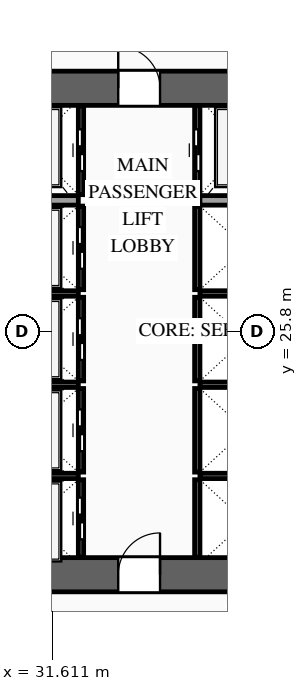
"""IFC4 building model, lengths in metres.
Left out: names, types, materials, properties, quantities, classifications, styles, units other than length and angle.
Written with IfcOpenShell. Run it as: python <this file> out.ifc"""

import sys

from ifc_helpers import new_model, si_unit, direction, frame, frame_2d, origin, place, context, subcontext, project, spatial, rectangle, extrude, source, transform, mapped, element, fill, save


model = new_model("IFC4")
c1 = context("Model", 3, precision=1e-05, world=origin(), true_north=direction((0.0, 1.0)))
c2 = subcontext(c1, "Body", "Model", "MODEL_VIEW")
j1 = project(units=[si_unit("LENGTHUNIT", "METRE"), si_unit("PLANEANGLEUNIT", "RADIAN")], contexts=[c1])
p1 = place(None, origin())
s1 = spatial("IfcSite", under=j1, at=p1, CompositionType="ELEMENT")
p2 = place(p1, origin())
s2 = spatial("IfcBuilding", under=s1, at=p2, CompositionType="ELEMENT")
p3 = place(p2, frame((0.0, 0.0, 30.6)))
s3 = spatial("IfcBuildingStorey", under=s2, at=p3, CompositionType="ELEMENT", Elevation=30.6)
p4 = place(p3, frame((23.35, 19.4, 0.0), z_axis=(0.0, 0.0, 1.0), x_axis=(1.0, 0.0, 0.0)))
e1 = element("IfcWall", 1, at=p4, inside=s3, PredefinedType="SHEAR", context=c2, shape_type="SweptSolid", body=[
    extrude(rectangle(XDim=27.3, YDim=0.9, at=frame_2d((13.65, 0.0))), origin(), (0.0, 0.0, 1.0), 3.6),
])
p5 = place(p4, frame((2.1, 0.0, 0.0)))
e2 = element("IfcOpeningElement", 2, at=p5, cuts=e1, PredefinedType="OPENING", context=c2, shape_type="SweptSolid", body=[
    extrude(rectangle(XDim=1.1, YDim=2.2, at=frame_2d((0.55, 1.1))), frame((0.0, 0.465, 0.0), z_axis=(0.0, -1.0, 0.0), x_axis=(1.0, 0.0, 0.0)), (0.0, 0.0, 1.0), 0.93),
])
p6 = place(p4, frame((10.0, 0.0, 0.0)))
e3 = element("IfcOpeningElement", 3, at=p6, cuts=e1, PredefinedType="OPENING", context=c2, shape_type="SweptSolid", body=[
    extrude(rectangle(XDim=1.1, YDim=2.2, at=frame_2d((0.55, 1.1))), frame((0.0, 0.465, 0.0), z_axis=(0.0, -1.0, 0.0), x_axis=(1.0, 0.0, 0.0)), (0.0, 0.0, 1.0), 0.93),
])
p7 = place(p4, frame((23.2, 0.0, 0.0)))
e4 = element("IfcOpeningElement", 4, at=p7, cuts=e1, PredefinedType="OPENING", context=c2, shape_type="SweptSolid", body=[
    extrude(rectangle(XDim=1.1, YDim=2.2, at=frame_2d((0.55, 1.1))), frame((0.0, 0.465, 0.0), z_axis=(0.0, -1.0, 0.0), x_axis=(1.0, 0.0, 0.0)), (0.0, 0.0, 1.0), 0.93),
])
p8 = place(p4, frame((19.82, 0.0, 0.0)))
e5 = element("IfcOpeningElement", 5, at=p8, cuts=e1, PredefinedType="OPENING", context=c2, shape_type="SweptSolid", body=[
    extrude(rectangle(XDim=0.9, YDim=2.15, at=frame_2d((0.45, 1.075))), frame((0.0, 0.465, 0.0), z_axis=(0.0, -1.0, 0.0), x_axis=(1.0, 0.0, 0.0)), (0.0, 0.0, 1.0), 0.93),
])
p9 = place(p4, frame((18.38, 0.0, 0.0)))
e6 = element("IfcOpeningElement", 6, at=p9, cuts=e1, PredefinedType="OPENING", context=c2, shape_type="SweptSolid", body=[
    extrude(rectangle(XDim=0.9, YDim=2.15, at=frame_2d((0.45, 1.075))), frame((0.0, 0.465, 0.0), z_axis=(0.0, -1.0, 0.0), x_axis=(1.0, 0.0, 0.0)), (0.0, 0.0, 1.0), 0.93),
])
p10 = place(p3, frame((23.35, 32.2, 0.0), z_axis=(0.0, 0.0, 1.0), x_axis=(1.0, 0.0, 0.0)))
e7 = element("IfcWall", 7, at=p10, inside=s3, PredefinedType="SHEAR", context=c2, shape_type="SweptSolid", body=[
    extrude(rectangle(XDim=27.3, YDim=0.9, at=frame_2d((13.65, 0.0))), origin(), (0.0, 0.0, 1.0), 3.6),
])
p11 = place(p10, frame((4.72, 0.0, 0.0)))
e8 = element("IfcOpeningElement", 8, at=p11, cuts=e7, PredefinedType="OPENING", context=c2, shape_type="SweptSolid", body=[
    extrude(rectangle(XDim=0.9, YDim=2.15, at=frame_2d((0.45, 1.075))), frame((0.0, 0.465, 0.0), z_axis=(0.0, -1.0, 0.0), x_axis=(1.0, 0.0, 0.0)), (0.0, 0.0, 1.0), 0.93),
])
p12 = place(p10, frame((10.0, 0.0, 0.0)))
e9 = element("IfcOpeningElement", 9, at=p12, cuts=e7, PredefinedType="OPENING", context=c2, shape_type="SweptSolid", body=[
    extrude(rectangle(XDim=1.1, YDim=2.2, at=frame_2d((0.55, 1.1))), frame((0.0, 0.465, 0.0), z_axis=(0.0, -1.0, 0.0), x_axis=(1.0, 0.0, 0.0)), (0.0, 0.0, 1.0), 0.93),
])
p13 = place(p10, frame((15.85, 0.0, 0.0)))
e10 = element("IfcOpeningElement", 10, at=p13, cuts=e7, PredefinedType="OPENING", context=c2, shape_type="SweptSolid", body=[
    extrude(rectangle(XDim=1.1, YDim=2.2, at=frame_2d((0.55, 1.1))), frame((0.0, 0.465, 0.0), z_axis=(0.0, -1.0, 0.0), x_axis=(1.0, 0.0, 0.0)), (0.0, 0.0, 1.0), 0.93),
])
p14 = place(p3, frame((32.37, 19.86, 0.0), z_axis=(0.0, 0.0, 1.0), x_axis=(0.0, 1.0, 0.0)))
e11 = element("IfcWall", 11, at=p14, inside=s3, PredefinedType="SOLIDWALL", context=c2, shape_type="SweptSolid", body=[
    extrude(rectangle(XDim=2.04, YDim=0.14, at=frame_2d((1.02, 0.0))), origin(), (0.0, 0.0, 1.0), 3.38),
])
p15 = place(p14, frame((0.47, 0.0, 0.0)))
e12 = element("IfcOpeningElement", 12, at=p15, cuts=e11, PredefinedType="OPENING", context=c2, shape_type="SweptSolid", body=[
    extrude(rectangle(XDim=1.1, YDim=2.2, at=frame_2d((0.55, 1.1))), frame((0.0, 0.085, 0.0), z_axis=(0.0, -1.0, 0.0), x_axis=(1.0, 0.0, 0.0)), (0.0, 0.0, 1.0), 0.17),
])
m1 = source(origin(), c2, "Body", "SweptSolid", [
    extrude(rectangle(XDim=2.5, YDim=0.14, at=frame_2d((1.25, 0.0))), origin(), (0.0, 0.0, 1.0), 3.38),
])
p16 = place(p3, frame((29.8, 22.0, 0.0), z_axis=(0.0, 0.0, 1.0), x_axis=(1.0, 0.0, 0.0)))
e13 = element("IfcWall", 13, at=p16, inside=s3, PredefinedType="SOLIDWALL", context=c2, shape_type="MappedRepresentation", body=[
    mapped(m1, transform((0.0, 0.0, 0.0), scale=1.0)),
])
p17 = place(p3, frame((32.37, 22.1, 0.0), z_axis=(0.0, 0.0, 1.0), x_axis=(0.0, 1.0, 0.0)))
e14 = element("IfcWall", 14, at=p17, inside=s3, PredefinedType="SOLIDWALL", context=c2, shape_type="SweptSolid", body=[
    extrude(rectangle(XDim=2.2, YDim=0.14, at=frame_2d((1.1, 0.0))), origin(), (0.0, 0.0, 1.0), 3.38),
])
p18 = place(p17, frame((0.55, 0.0, 0.0)))
e15 = element("IfcOpeningElement", 15, at=p18, cuts=e14, PredefinedType="OPENING", context=c2, shape_type="SweptSolid", body=[
    extrude(rectangle(XDim=1.1, YDim=2.2, at=frame_2d((0.55, 1.1))), frame((0.0, 0.085, 0.0), z_axis=(0.0, -1.0, 0.0), x_axis=(1.0, 0.0, 0.0)), (0.0, 0.0, 1.0), 0.17),
])
p19 = place(p3, frame((29.8, 24.4, 0.0), z_axis=(0.0, 0.0, 1.0), x_axis=(1.0, 0.0, 0.0)))
e16 = element("IfcWall", 16, at=p19, inside=s3, PredefinedType="SOLIDWALL", context=c2, shape_type="MappedRepresentation", body=[
    mapped(m1, transform((0.0, 0.0, 0.0), scale=1.0)),
])
p20 = place(p3, frame((32.37, 24.5, 0.0), z_axis=(0.0, 0.0, 1.0), x_axis=(0.0, 1.0, 0.0)))
e17 = element("IfcWall", 17, at=p20, inside=s3, PredefinedType="SOLIDWALL", context=c2, shape_type="SweptSolid", body=[
    extrude(rectangle(XDim=2.2, YDim=0.14, at=frame_2d((1.1, 0.0))), origin(), (0.0, 0.0, 1.0), 3.38),
])
p21 = place(p20, frame((0.55, 0.0, 0.0)))
e18 = element("IfcOpeningElement", 18, at=p21, cuts=e17, PredefinedType="OPENING", context=c2, shape_type="SweptSolid", body=[
    extrude(rectangle(XDim=1.1, YDim=2.2, at=frame_2d((0.55, 1.1))), frame((0.0, 0.085, 0.0), z_axis=(0.0, -1.0, 0.0), x_axis=(1.0, 0.0, 0.0)), (0.0, 0.0, 1.0), 0.17),
])
p22 = place(p3, frame((29.8, 26.8, 0.0), z_axis=(0.0, 0.0, 1.0), x_axis=(1.0, 0.0, 0.0)))
e19 = element("IfcWall", 19, at=p22, inside=s3, PredefinedType="SOLIDWALL", context=c2, shape_type="MappedRepresentation", body=[
    mapped(m1, transform((0.0, 0.0, 0.0), scale=1.0)),
])
p23 = place(p3, frame((32.37, 26.9, 0.0), z_axis=(0.0, 0.0, 1.0), x_axis=(0.0, 1.0, 0.0)))
e20 = element("IfcWall", 20, at=p23, inside=s3, PredefinedType="SOLIDWALL", context=c2, shape_type="SweptSolid", body=[
    extrude(rectangle(XDim=2.2, YDim=0.14, at=frame_2d((1.1, 0.0))), origin(), (0.0, 0.0, 1.0), 3.38),
])
p24 = place(p23, frame((0.55, 0.0, 0.0)))
e21 = element("IfcOpeningElement", 21, at=p24, cuts=e20, PredefinedType="OPENING", context=c2, shape_type="SweptSolid", body=[
    extrude(rectangle(XDim=1.1, YDim=2.2, at=frame_2d((0.55, 1.1))), frame((0.0, 0.085, 0.0), z_axis=(0.0, -1.0, 0.0), x_axis=(1.0, 0.0, 0.0)), (0.0, 0.0, 1.0), 0.17),
])
p25 = place(p3, frame((32.37, 29.4, 0.0), z_axis=(0.0, 0.0, 1.0), x_axis=(0.0, 1.0, 0.0)))
e22 = element("IfcWall", 22, at=p25, inside=s3, PredefinedType="SOLIDWALL", context=c2, shape_type="SweptSolid", body=[
    extrude(rectangle(XDim=2.34, YDim=0.14, at=frame_2d((1.17, 0.0))), origin(), (0.0, 0.0, 1.0), 3.38),
])
p26 = place(p25, frame((0.62, 0.0, 0.0)))
e23 = element("IfcOpeningElement", 23, at=p26, cuts=e22, PredefinedType="OPENING", context=c2, shape_type="SweptSolid", body=[
    extrude(rectangle(XDim=1.1, YDim=2.2, at=frame_2d((0.55, 1.1))), frame((0.0, 0.085, 0.0), z_axis=(0.0, -1.0, 0.0), x_axis=(1.0, 0.0, 0.0)), (0.0, 0.0, 1.0), 0.17),
])
m2 = source(origin(), c2, "Body", "SweptSolid", [
    extrude(rectangle(XDim=2.5, YDim=0.25, at=frame_2d((1.25, 0.0))), origin(), (0.0, 0.0, 1.0), 3.38),
])
p27 = place(p3, frame((29.8, 29.25, 0.0), z_axis=(0.0, 0.0, 1.0), x_axis=(1.0, 0.0, 0.0)))
e24 = element("IfcWall", 24, at=p27, inside=s3, PredefinedType="SOLIDWALL", context=c2, shape_type="MappedRepresentation", body=[
    mapped(m2, transform((0.0, 0.0, 0.0), scale=1.0)),
])
m3 = source(origin(), c2, "Body", "SweptSolid", [
    extrude(rectangle(XDim=2.04, YDim=0.14, at=frame_2d((1.02, 0.0))), origin(), (0.0, 0.0, 1.0), 3.38),
])
p28 = place(p3, frame((35.43, 19.86, 0.0), z_axis=(0.0, 0.0, 1.0), x_axis=(0.0, 1.0, 0.0)))
e25 = element("IfcWall", 25, at=p28, inside=s3, PredefinedType="SOLIDWALL", context=c2, shape_type="MappedRepresentation", body=[
    mapped(m3, transform((0.0, 0.0, 0.0), scale=1.0)),
])
m4 = source(origin(), c2, "Body", "SweptSolid", [
    extrude(rectangle(XDim=2.4, YDim=0.14, at=frame_2d((1.2, 0.0))), origin(), (0.0, 0.0, 1.0), 3.38),
])
p29 = place(p3, frame((35.5, 22.0, 0.0), z_axis=(0.0, 0.0, 1.0), x_axis=(1.0, 0.0, 0.0)))
e26 = element("IfcWall", 26, at=p29, inside=s3, PredefinedType="SOLIDWALL", context=c2, shape_type="MappedRepresentation", body=[
    mapped(m4, transform((0.0, 0.0, 0.0), scale=1.0)),
])
m5 = source(origin(), c2, "Body", "SweptSolid", [
    extrude(rectangle(XDim=2.2, YDim=0.14, at=frame_2d((1.1, 0.0))), origin(), (0.0, 0.0, 1.0), 3.38),
])
p30 = place(p3, frame((35.43, 22.1, 0.0), z_axis=(0.0, 0.0, 1.0), x_axis=(0.0, 1.0, 0.0)))
e27 = element("IfcWall", 27, at=p30, inside=s3, PredefinedType="SOLIDWALL", context=c2, shape_type="MappedRepresentation", body=[
    mapped(m5, transform((0.0, 0.0, 0.0), scale=1.0)),
])
p31 = place(p3, frame((35.5, 24.4, 0.0), z_axis=(0.0, 0.0, 1.0), x_axis=(1.0, 0.0, 0.0)))
e28 = element("IfcWall", 28, at=p31, inside=s3, PredefinedType="SOLIDWALL", context=c2, shape_type="MappedRepresentation", body=[
    mapped(m4, transform((0.0, 0.0, 0.0), scale=1.0)),
])
p32 = place(p3, frame((35.43, 24.5, 0.0), z_axis=(0.0, 0.0, 1.0), x_axis=(0.0, 1.0, 0.0)))
e29 = element("IfcWall", 29, at=p32, inside=s3, PredefinedType="SOLIDWALL", context=c2, shape_type="MappedRepresentation", body=[
    mapped(m5, transform((0.0, 0.0, 0.0), scale=1.0)),
])
p33 = place(p3, frame((35.5, 26.8, 0.0), z_axis=(0.0, 0.0, 1.0), x_axis=(1.0, 0.0, 0.0)))
e30 = element("IfcWall", 30, at=p33, inside=s3, PredefinedType="SOLIDWALL", context=c2, shape_type="MappedRepresentation", body=[
    mapped(m4, transform((0.0, 0.0, 0.0), scale=1.0)),
])
m6 = source(origin(), c2, "Body", "SweptSolid", [
    extrude(rectangle(XDim=2.2, YDim=0.14, at=frame_2d((1.1, 0.0))), origin(), (0.0, 0.0, 1.0), 3.38),
])
p34 = place(p3, frame((35.43, 26.9, 0.0), z_axis=(0.0, 0.0, 1.0), x_axis=(0.0, 1.0, 0.0)))
e31 = element("IfcWall", 31, at=p34, inside=s3, PredefinedType="SOLIDWALL", context=c2, shape_type="MappedRepresentation", body=[
    mapped(m6, transform((0.0, 0.0, 0.0), scale=1.0)),
])
p35 = place(p3, frame((35.43, 29.4, 0.0), z_axis=(0.0, 0.0, 1.0), x_axis=(0.0, 1.0, 0.0)))
e32 = element("IfcWall", 32, at=p35, inside=s3, PredefinedType="SOLIDWALL", context=c2, shape_type="SweptSolid", body=[
    extrude(rectangle(XDim=2.34, YDim=0.14, at=frame_2d((1.17, 0.0))), origin(), (0.0, 0.0, 1.0), 3.38),
])
p36 = place(p35, frame((0.62, 0.0, 0.0)))
e33 = element("IfcOpeningElement", 33, at=p36, cuts=e32, PredefinedType="OPENING", context=c2, shape_type="SweptSolid", body=[
    extrude(rectangle(XDim=1.1, YDim=2.2, at=frame_2d((0.55, 1.1))), frame((0.0, 0.085, 0.0), z_axis=(0.0, -1.0, 0.0), x_axis=(1.0, 0.0, 0.0)), (0.0, 0.0, 1.0), 0.17),
])
m7 = source(origin(), c2, "Body", "SweptSolid", [
    extrude(rectangle(XDim=2.4, YDim=0.25, at=frame_2d((1.2, 0.0))), origin(), (0.0, 0.0, 1.0), 3.38),
])
p37 = place(p3, frame((35.5, 29.25, 0.0), z_axis=(0.0, 0.0, 1.0), x_axis=(1.0, 0.0, 0.0)))
e34 = element("IfcWall", 34, at=p37, inside=s3, PredefinedType="SOLIDWALL", context=c2, shape_type="MappedRepresentation", body=[
    mapped(m7, transform((0.0, 0.0, 0.0), scale=1.0)),
])
m8 = source(origin(), c2, "Body", "SweptSolid", [
    extrude(rectangle(XDim=1.1, YDim=2.2, at=frame_2d((0.55, 1.1))), frame((0.0, 0.025, 0.0), z_axis=(0.0, -1.0, 0.0), x_axis=(1.0, 0.0, 0.0)), (0.0, 0.0, 1.0), 0.05),
])
p38 = place(p15, origin())
e35 = element("IfcDoor", 35, at=p38, inside=s3, OperationType="SLIDING_TO_LEFT", PredefinedType="DOOR", context=c2, shape_type="MappedRepresentation", body=[
    mapped(m8, transform((0.0, 0.0, 0.0), scale=1.0)),
])
fill(e12, e35)
p39 = place(p18, origin())
e36 = element("IfcDoor", 36, at=p39, inside=s3, OperationType="SLIDING_TO_RIGHT", PredefinedType="DOOR", context=c2, shape_type="MappedRepresentation", body=[
    mapped(m8, transform((0.0, 0.0, 0.0), scale=1.0)),
])
fill(e15, e36)
p40 = place(p21, origin())
e37 = element("IfcDoor", 37, at=p40, inside=s3, OperationType="SLIDING_TO_LEFT", PredefinedType="DOOR", context=c2, shape_type="MappedRepresentation", body=[
    mapped(m8, transform((0.0, 0.0, 0.0), scale=1.0)),
])
fill(e18, e37)
p41 = place(p24, origin())
e38 = element("IfcDoor", 38, at=p41, inside=s3, OperationType="SLIDING_TO_RIGHT", PredefinedType="DOOR", context=c2, shape_type="MappedRepresentation", body=[
    mapped(m8, transform((0.0, 0.0, 0.0), scale=1.0)),
])
fill(e21, e38)
p42 = place(p26, origin())
e39 = element("IfcDoor", 39, at=p42, inside=s3, OperationType="SLIDING_TO_LEFT", PredefinedType="DOOR", context=c2, shape_type="MappedRepresentation", body=[
    mapped(m8, transform((0.0, 0.0, 0.0), scale=1.0)),
])
fill(e23, e39)
p43 = place(p36, origin())
e40 = element("IfcDoor", 40, at=p43, inside=s3, OperationType="SLIDING_TO_RIGHT", PredefinedType="DOOR", context=c2, shape_type="MappedRepresentation", body=[
    mapped(m8, transform((0.0, 0.0, 0.0), scale=1.0)),
])
fill(e33, e40)
m9 = source(origin(), c2, "Body", "SweptSolid", [
    extrude(rectangle(XDim=1.1, YDim=2.2, at=frame_2d((0.55, 1.1))), frame((0.0, 0.025, 0.0), z_axis=(0.0, -1.0, 0.0), x_axis=(1.0, 0.0, 0.0)), (0.0, 0.0, 1.0), 0.05),
])
p44 = place(p6, origin())
e41 = element("IfcDoor", 41, at=p44, inside=s3, OperationType="SINGLE_SWING_RIGHT", PredefinedType="DOOR", context=c2, shape_type="MappedRepresentation", body=[
    mapped(m9, transform((0.0, 0.0, 0.0), scale=1.0)),
])
fill(e3, e41)
p45 = place(p12, origin())
e42 = element("IfcDoor", 42, at=p45, inside=s3, OperationType="SINGLE_SWING_LEFT", PredefinedType="DOOR", context=c2, shape_type="MappedRepresentation", body=[
    mapped(m9, transform((0.0, 0.0, 0.0), scale=1.0)),
])
fill(e9, e42)
save(model, sys.argv[1])
